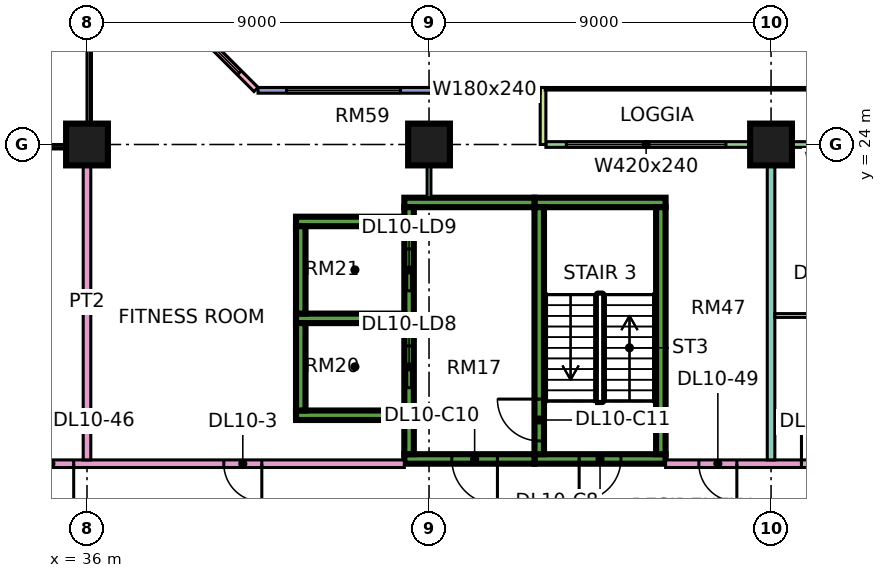
"""IFC4 building model, lengths in metres.
Left out: names, types, materials, properties, quantities, classifications, styles, units other than length and angle.
Written with IfcOpenShell. Run it as: python <this file> out.ifc"""

import sys

from ifc_helpers import new_model, si_unit, direction, frame, frame_2d, origin, origin_2d, place, context, subcontext, project, spatial, rectangle, extrude, element, fill, save


model = new_model("IFC4")
c1 = context("Model", 3, precision=1e-05, world=origin(), true_north=direction((0.0, 1.0)))
c2 = subcontext(c1, "Body", "Model", "MODEL_VIEW")
j1 = project(units=[si_unit("LENGTHUNIT", "METRE"), si_unit("PLANEANGLEUNIT", "RADIAN")], contexts=[c1])
p1 = place(None, origin())
s1 = spatial("IfcSite", under=j1, at=p1, CompositionType="ELEMENT")
p2 = place(p1, origin())
s2 = spatial("IfcBuilding", under=s1, at=p2, CompositionType="ELEMENT")
p3 = place(p2, frame((0.0, 0.0, 52.65)))
s3 = spatial("IfcBuildingStorey", under=s2, at=p3, CompositionType="ELEMENT", Elevation=52.65)
for number, where, z_axis, x_axis in (
    (1, (36.0, 24.0, 0.0), (0.0, 0.0, 1.0), (1.0, 0.0, 0.0)),
    (2, (45.0, 24.0, 0.0), (0.0, 0.0, 1.0), (1.0, 0.0, 0.0)),
    (3, (54.0, 24.0, 0.0), (0.0, 0.0, 1.0), (1.0, 0.0, 0.0)),
):
    element("IfcColumn", number, at=place(p3, frame(where, z_axis=z_axis, x_axis=x_axis)), inside=s3, PredefinedType="COLUMN", context=c2, shape_type="SweptSolid", body=[
        extrude(rectangle(XDim=1.1, YDim=1.1, at=origin_2d()), origin(), (0.0, 0.0, 1.0), 3.75),
    ])
p4 = place(p3, frame((47.775, 15.725, 0.0), z_axis=(0.0, 0.0, 1.0), x_axis=(1.0, 0.0, 0.0)))
e4 = element("IfcWall", 4, at=p4, inside=s3, PredefinedType="SHEAR", context=c2, shape_type="SweptSolid", body=[
    extrude(rectangle(XDim=3.45, YDim=0.25, at=frame_2d((1.725, 0.0))), origin(), (0.0, 0.0, 1.0), 3.75),
])
p5 = place(p4, frame((1.175, 0.0, 0.0)))
e5 = element("IfcOpeningElement", 5, at=p5, cuts=e4, PredefinedType="OPENING", context=c2, shape_type="SweptSolid", body=[
    extrude(rectangle(XDim=1.1, YDim=2.2, at=frame_2d((0.55, 1.1))), frame((0.0, 0.135, 0.0), z_axis=(0.0, -1.0, 0.0), x_axis=(1.0, 0.0, 0.0)), (0.0, 0.0, 1.0), 0.27),
])
p6 = place(p3, frame((47.775, 22.475, 0.0), z_axis=(0.0, 0.0, 1.0), x_axis=(1.0, 0.0, 0.0)))
e6 = element("IfcWall", 6, at=p6, inside=s3, PredefinedType="SHEAR", context=c2, shape_type="SweptSolid", body=[
    extrude(rectangle(XDim=3.45, YDim=0.25, at=frame_2d((1.725, 0.0))), origin(), (0.0, 0.0, 1.0), 3.75),
])
p7 = place(p3, frame((47.9, 15.85, 0.0), z_axis=(0.0, 0.0, 1.0), x_axis=(0.0, 1.0, 0.0)))
e7 = element("IfcWall", 7, at=p7, inside=s3, PredefinedType="SHEAR", context=c2, shape_type="SweptSolid", body=[
    extrude(rectangle(XDim=6.5, YDim=0.25, at=frame_2d((3.25, 0.0))), origin(), (0.0, 0.0, 1.0), 3.75),
])
p8 = place(p7, frame((0.35, 0.0, 0.0)))
e8 = element("IfcOpeningElement", 8, at=p8, cuts=e7, PredefinedType="OPENING", context=c2, shape_type="SweptSolid", body=[
    extrude(rectangle(XDim=1.1, YDim=2.2, at=frame_2d((0.55, 1.1))), frame((0.0, 0.135, 0.0), z_axis=(0.0, -1.0, 0.0), x_axis=(1.0, 0.0, 0.0)), (0.0, 0.0, 1.0), 0.27),
])
p9 = place(p3, frame((51.1, 15.85, 0.0), z_axis=(0.0, 0.0, 1.0), x_axis=(0.0, 1.0, 0.0)))
e9 = element("IfcWall", 9, at=p9, inside=s3, PredefinedType="SHEAR", context=c2, shape_type="SweptSolid", body=[
    extrude(rectangle(XDim=6.5, YDim=0.25, at=frame_2d((3.25, 0.0))), origin(), (0.0, 0.0, 1.0), 3.75),
])
p10 = place(p3, frame((44.35, 15.725, 0.0), z_axis=(0.0, 0.0, 1.0), x_axis=(1.0, 0.0, 0.0)))
e10 = element("IfcWall", 10, at=p10, inside=s3, PredefinedType="SHEAR", context=c2, shape_type="SweptSolid", body=[
    extrude(rectangle(XDim=3.425, YDim=0.25, at=frame_2d((1.712, 0.0))), origin(), (0.0, 0.0, 1.0), 3.75),
])
p11 = place(p10, frame((1.25, 0.0, 0.0)))
e11 = element("IfcOpeningElement", 11, at=p11, cuts=e10, PredefinedType="OPENING", context=c2, shape_type="SweptSolid", body=[
    extrude(rectangle(XDim=1.2, YDim=2.2, at=frame_2d((0.6, 1.1))), frame((0.0, 0.135, 0.0), z_axis=(0.0, -1.0, 0.0), x_axis=(1.0, 0.0, 0.0)), (0.0, 0.0, 1.0), 0.27),
])
p12 = place(p3, frame((44.35, 22.475, 0.0), z_axis=(0.0, 0.0, 1.0), x_axis=(1.0, 0.0, 0.0)))
e12 = element("IfcWall", 12, at=p12, inside=s3, PredefinedType="SHEAR", context=c2, shape_type="SweptSolid", body=[
    extrude(rectangle(XDim=3.425, YDim=0.25, at=frame_2d((1.712, 0.0))), origin(), (0.0, 0.0, 1.0), 3.75),
])
p13 = place(p3, frame((44.475, 15.85, 0.0), z_axis=(0.0, 0.0, 1.0), x_axis=(0.0, 1.0, 0.0)))
e13 = element("IfcWall", 13, at=p13, inside=s3, PredefinedType="SHEAR", context=c2, shape_type="SweptSolid", body=[
    extrude(rectangle(XDim=6.5, YDim=0.25, at=frame_2d((3.25, 0.0))), origin(), (0.0, 0.0, 1.0), 3.75),
])
p14 = place(p13, frame((1.75, 0.0, 0.0)))
e14 = element("IfcOpeningElement", 14, at=p14, cuts=e13, PredefinedType="OPENING", context=c2, shape_type="SweptSolid", body=[
    extrude(rectangle(XDim=1.1, YDim=2.2, at=frame_2d((0.55, 1.1))), frame((0.0, 0.135, 0.0), z_axis=(0.0, -1.0, 0.0), x_axis=(1.0, 0.0, 0.0)), (0.0, 0.0, 1.0), 0.27),
])
p15 = place(p13, frame((4.3, 0.0, 0.0)))
e15 = element("IfcOpeningElement", 15, at=p15, cuts=e13, PredefinedType="OPENING", context=c2, shape_type="SweptSolid", body=[
    extrude(rectangle(XDim=1.1, YDim=2.2, at=frame_2d((0.55, 1.1))), frame((0.0, 0.135, 0.0), z_axis=(0.0, -1.0, 0.0), x_axis=(1.0, 0.0, 0.0)), (0.0, 0.0, 1.0), 0.27),
])
for number, where, z_axis, x_axis in (
    (16, (41.5, 16.875, 0.0), (0.0, 0.0, 1.0), (1.0, 0.0, 0.0)),
    (17, (41.5, 19.425, 0.0), (0.0, 0.0, 1.0), (1.0, 0.0, 0.0)),
    (18, (41.5, 21.975, 0.0), (0.0, 0.0, 1.0), (1.0, 0.0, 0.0)),
):
    element("IfcWall", number, at=place(p3, frame(where, z_axis=z_axis, x_axis=x_axis)), inside=s3, PredefinedType="SHEAR", context=c2, shape_type="SweptSolid", body=[
        extrude(rectangle(XDim=2.85, YDim=0.25, at=frame_2d((1.425, 0.0))), origin(), (0.0, 0.0, 1.0), 3.75),
    ])
for number, where, z_axis, x_axis in (
    (19, (41.625, 17.0, 0.0), (0.0, 0.0, 1.0), (0.0, 1.0, 0.0)),
    (20, (41.625, 19.55, 0.0), (0.0, 0.0, 1.0), (0.0, 1.0, 0.0)),
):
    element("IfcWall", number, at=place(p3, frame(where, z_axis=z_axis, x_axis=x_axis)), inside=s3, PredefinedType="SHEAR", context=c2, shape_type="SweptSolid", body=[
        extrude(rectangle(XDim=2.3, YDim=0.25, at=frame_2d((1.15, 0.0))), origin(), (0.0, 0.0, 1.0), 3.75),
    ])
p16 = place(p3, frame((59.925, 24.0, 0.0), z_axis=(0.0, 0.0, 1.0), x_axis=(-1.0, 0.0, 0.0)))
e21 = element("IfcWall", 21, at=p16, inside=s3, PredefinedType="SOLIDWALL", context=c2, shape_type="SweptSolid", body=[
    extrude(rectangle(XDim=11.85, YDim=0.15, at=frame_2d((5.925, 0.0))), origin(), (0.0, 0.0, 1.0), 3.35),
])
p17 = place(p16, frame((0.562, 0.0, 0.45)))
e22 = element("IfcOpeningElement", 22, at=p17, cuts=e21, PredefinedType="OPENING", context=c2, shape_type="SweptSolid", body=[
    extrude(rectangle(XDim=1.8, YDim=2.4, at=frame_2d((0.9, 1.2))), frame((0.0, 0.085, 0.0), z_axis=(0.0, -1.0, 0.0), x_axis=(1.0, 0.0, 0.0)), (0.0, 0.0, 1.0), 0.17),
])
p18 = place(p16, frame((3.5, 0.0, 0.45)))
e23 = element("IfcOpeningElement", 23, at=p18, cuts=e21, PredefinedType="OPENING", context=c2, shape_type="SweptSolid", body=[
    extrude(rectangle(XDim=1.2, YDim=2.4, at=frame_2d((0.6, 1.2))), frame((0.0, 0.085, 0.0), z_axis=(0.0, -1.0, 0.0), x_axis=(1.0, 0.0, 0.0)), (0.0, 0.0, 1.0), 0.17),
])
p19 = place(p16, frame((7.113, 0.0, 0.45)))
e24 = element("IfcOpeningElement", 24, at=p19, cuts=e21, PredefinedType="OPENING", context=c2, shape_type="SweptSolid", body=[
    extrude(rectangle(XDim=4.2, YDim=2.4, at=frame_2d((2.1, 1.2))), frame((0.0, 0.085, 0.0), z_axis=(0.0, -1.0, 0.0), x_axis=(1.0, 0.0, 0.0)), (0.0, 0.0, 1.0), 0.17),
])
p20 = place(p3, frame((48.0, 25.5, 0.0), z_axis=(0.0, 0.0, 1.0), x_axis=(0.0, -1.0, 0.0)))
e25 = element("IfcWall", 25, at=p20, inside=s3, PredefinedType="SOLIDWALL", context=c2, shape_type="SweptSolid", body=[
    extrude(rectangle(XDim=1.5, YDim=0.15, at=frame_2d((0.75, 0.0))), origin(), (0.0, 0.0, 1.0), 3.35),
])
p21 = place(p3, frame((47.925, 25.425, 0.0), z_axis=(0.0, 0.0, 1.0), x_axis=(-1.0, 0.0, 0.0)))
e26 = element("IfcWall", 26, at=p21, inside=s3, PredefinedType="SOLIDWALL", context=c2, shape_type="SweptSolid", body=[
    extrude(rectangle(XDim=7.425, YDim=0.15, at=frame_2d((3.712, 0.0))), origin(), (0.0, 0.0, 1.0), 3.35),
])
p22 = place(p21, frame((0.562, 0.0, 0.45)))
e27 = element("IfcOpeningElement", 27, at=p22, cuts=e26, PredefinedType="OPENING", context=c2, shape_type="SweptSolid", body=[
    extrude(rectangle(XDim=1.8, YDim=2.4, at=frame_2d((0.9, 1.2))), frame((0.0, 0.085, 0.0), z_axis=(0.0, -1.0, 0.0), x_axis=(1.0, 0.0, 0.0)), (0.0, 0.0, 1.0), 0.17),
])
p23 = place(p21, frame((3.675, 0.0, 0.45)))
e28 = element("IfcOpeningElement", 28, at=p23, cuts=e26, PredefinedType="OPENING", context=c2, shape_type="SweptSolid", body=[
    extrude(rectangle(XDim=3.0, YDim=2.4, at=frame_2d((1.5, 1.2))), frame((0.0, 0.085, 0.0), z_axis=(0.0, -1.0, 0.0), x_axis=(1.0, 0.0, 0.0)), (0.0, 0.0, 1.0), 0.17),
])
p24 = place(p3, frame((40.447, 25.447, 0.0), z_axis=(0.0, 0.0, 1.0), x_axis=(-0.707106781187, 0.707106781187, 0.0)))
e29 = element("IfcWall", 29, at=p24, inside=s3, PredefinedType="SOLIDWALL", context=c2, shape_type="SweptSolid", body=[
    extrude(rectangle(XDim=4.243, YDim=0.15, at=frame_2d((2.121, 0.0))), origin(), (0.0, 0.0, 1.0), 3.35),
])
p25 = place(p24, frame((0.621, 0.0, 0.45)))
e30 = element("IfcOpeningElement", 30, at=p25, cuts=e29, PredefinedType="OPENING", context=c2, shape_type="SweptSolid", body=[
    extrude(rectangle(XDim=3.0, YDim=2.4, at=frame_2d((1.5, 1.2))), frame((0.0, 0.085, 0.0), z_axis=(0.0, -1.0, 0.0), x_axis=(1.0, 0.0, 0.0)), (0.0, 0.0, 1.0), 0.17),
])
p26 = place(p3, frame((34.0, 15.6, 0.0), z_axis=(0.0, 0.0, 1.0), x_axis=(1.0, 0.0, 0.0)))
e31 = element("IfcWall", 31, at=p26, inside=s3, PredefinedType="PARTITIONING", context=c2, shape_type="SweptSolid", body=[
    extrude(rectangle(XDim=10.35, YDim=0.2, at=frame_2d((5.175, 0.0))), origin(), (0.0, 0.0, 1.0), 3.35),
])
p27 = place(p26, frame((5.6, 0.0, 0.0)))
e32 = element("IfcOpeningElement", 32, at=p27, cuts=e31, PredefinedType="OPENING", context=c2, shape_type="SweptSolid", body=[
    extrude(rectangle(XDim=1.0, YDim=2.1, at=frame_2d((0.5, 1.05))), frame((0.0, 0.11, 0.0), z_axis=(0.0, -1.0, 0.0), x_axis=(1.0, 0.0, 0.0)), (0.0, 0.0, 1.0), 0.22),
])
p28 = place(p26, frame((0.45, 0.0, 0.0)))
e33 = element("IfcOpeningElement", 33, at=p28, cuts=e31, PredefinedType="OPENING", context=c2, shape_type="SweptSolid", body=[
    extrude(rectangle(XDim=1.2, YDim=2.1, at=frame_2d((0.6, 1.05))), frame((0.0, 0.11, 0.0), z_axis=(0.0, -1.0, 0.0), x_axis=(1.0, 0.0, 0.0)), (0.0, 0.0, 1.0), 0.22),
])
p29 = place(p3, frame((36.0, 15.7, 0.0), z_axis=(0.0, 0.0, 1.0), x_axis=(0.0, 1.0, 0.0)))
e34 = element("IfcWall", 34, at=p29, inside=s3, PredefinedType="PARTITIONING", context=c2, shape_type="SweptSolid", body=[
    extrude(rectangle(XDim=8.3, YDim=0.2, at=frame_2d((4.15, 0.0))), origin(), (0.0, 0.0, 1.0), 3.35),
])
p30 = place(p3, frame((45.0, 22.6, 0.0), z_axis=(0.0, 0.0, 1.0), x_axis=(0.0, 1.0, 0.0)))
e35 = element("IfcWall", 35, at=p30, inside=s3, PredefinedType="PARTITIONING", context=c2, shape_type="SweptSolid", body=[
    extrude(rectangle(XDim=1.4, YDim=0.1, at=frame_2d((0.7, 0.0))), origin(), (0.0, 0.0, 1.0), 3.35),
])
p31 = place(p3, frame((51.225, 15.6, 0.0), z_axis=(0.0, 0.0, 1.0), x_axis=(1.0, 0.0, 0.0)))
e36 = element("IfcWall", 36, at=p31, inside=s3, PredefinedType="PARTITIONING", context=c2, shape_type="SweptSolid", body=[
    extrude(rectangle(XDim=22.125, YDim=0.2, at=frame_2d((11.062, 0.0))), origin(), (0.0, 0.0, 1.0), 3.35),
])
p32 = place(p31, frame((3.575, 0.0, 0.0)))
e37 = element("IfcOpeningElement", 37, at=p32, cuts=e36, PredefinedType="OPENING", context=c2, shape_type="SweptSolid", body=[
    extrude(rectangle(XDim=1.0, YDim=2.1, at=frame_2d((0.5, 1.05))), frame((0.0, 0.11, 0.0), z_axis=(0.0, -1.0, 0.0), x_axis=(1.0, 0.0, 0.0)), (0.0, 0.0, 1.0), 0.22),
])
p33 = place(p31, frame((0.875, 0.0, 0.0)))
e38 = element("IfcOpeningElement", 38, at=p33, cuts=e36, PredefinedType="OPENING", context=c2, shape_type="SweptSolid", body=[
    extrude(rectangle(XDim=1.0, YDim=2.1, at=frame_2d((0.5, 1.05))), frame((0.0, 0.11, 0.0), z_axis=(0.0, -1.0, 0.0), x_axis=(1.0, 0.0, 0.0)), (0.0, 0.0, 1.0), 0.22),
])
p34 = place(p3, frame((54.0, 15.7, 0.0), z_axis=(0.0, 0.0, 1.0), x_axis=(0.0, 1.0, 0.0)))
e39 = element("IfcWall", 39, at=p34, inside=s3, PredefinedType="PARTITIONING", context=c2, shape_type="SweptSolid", body=[
    extrude(rectangle(XDim=8.226, YDim=0.2, at=frame_2d((4.113, 0.0))), origin(), (0.0, 0.0, 1.0), 3.35),
])
p35 = place(p3, frame((54.1, 19.5, 0.0), z_axis=(0.0, 0.0, 1.0), x_axis=(1.0, 0.0, 0.0)))
e40 = element("IfcWall", 40, at=p35, inside=s3, PredefinedType="PARTITIONING", context=c2, shape_type="SweptSolid", body=[
    extrude(rectangle(XDim=8.95, YDim=0.1, at=frame_2d((4.475, 0.0))), origin(), (0.0, 0.0, 1.0), 3.35),
])
p36 = place(p35, frame((0.95, 0.0, 0.0)))
e41 = element("IfcOpeningElement", 41, at=p36, cuts=e40, PredefinedType="OPENING", context=c2, shape_type="SweptSolid", body=[
    extrude(rectangle(XDim=0.9, YDim=2.1, at=frame_2d((0.45, 1.05))), frame((0.0, 0.06, 0.0), z_axis=(0.0, -1.0, 0.0), x_axis=(1.0, 0.0, 0.0)), (0.0, 0.0, 1.0), 0.12),
])
p37 = place(p35, frame((3.95, 0.0, 0.0)))
e42 = element("IfcOpeningElement", 42, at=p37, cuts=e40, PredefinedType="OPENING", context=c2, shape_type="SweptSolid", body=[
    extrude(rectangle(XDim=0.9, YDim=2.1, at=frame_2d((0.45, 1.05))), frame((0.0, 0.06, 0.0), z_axis=(0.0, -1.0, 0.0), x_axis=(1.0, 0.0, 0.0)), (0.0, 0.0, 1.0), 0.12),
])
p38 = place(p35, frame((6.95, 0.0, 0.0)))
e43 = element("IfcOpeningElement", 43, at=p38, cuts=e40, PredefinedType="OPENING", context=c2, shape_type="SweptSolid", body=[
    extrude(rectangle(XDim=0.9, YDim=2.1, at=frame_2d((0.45, 1.05))), frame((0.0, 0.06, 0.0), z_axis=(0.0, -1.0, 0.0), x_axis=(1.0, 0.0, 0.0)), (0.0, 0.0, 1.0), 0.12),
])
p39 = place(p19, origin())
e44 = element("IfcWindow", 44, at=p39, inside=s3, PartitioningType="SINGLE_PANEL", PredefinedType="WINDOW", context=c2, shape_type="SweptSolid", body=[
    extrude(rectangle(XDim=4.2, YDim=2.4, at=frame_2d((2.1, 1.2))), frame((0.0, 0.03, 0.0), z_axis=(0.0, -1.0, 0.0), x_axis=(1.0, 0.0, 0.0)), (0.0, 0.0, 1.0), 0.06),
])
fill(e24, e44)
p40 = place(p22, origin())
e45 = element("IfcWindow", 45, at=p40, inside=s3, PartitioningType="SINGLE_PANEL", PredefinedType="WINDOW", context=c2, shape_type="SweptSolid", body=[
    extrude(rectangle(XDim=1.8, YDim=2.4, at=frame_2d((0.9, 1.2))), frame((0.0, 0.03, 0.0), z_axis=(0.0, -1.0, 0.0), x_axis=(1.0, 0.0, 0.0)), (0.0, 0.0, 1.0), 0.06),
])
fill(e27, e45)
p41 = place(p23, origin())
e46 = element("IfcWindow", 46, at=p41, inside=s3, PartitioningType="SINGLE_PANEL", PredefinedType="WINDOW", context=c2, shape_type="SweptSolid", body=[
    extrude(rectangle(XDim=3.0, YDim=2.4, at=frame_2d((1.5, 1.2))), frame((0.0, 0.03, 0.0), z_axis=(0.0, -1.0, 0.0), x_axis=(1.0, 0.0, 0.0)), (0.0, 0.0, 1.0), 0.06),
])
fill(e28, e46)
p42 = place(p25, origin())
e47 = element("IfcWindow", 47, at=p42, inside=s3, PartitioningType="SINGLE_PANEL", PredefinedType="WINDOW", context=c2, shape_type="SweptSolid", body=[
    extrude(rectangle(XDim=3.0, YDim=2.4, at=frame_2d((1.5, 1.2))), frame((0.0, 0.03, 0.0), z_axis=(0.0, -1.0, 0.0), x_axis=(1.0, 0.0, 0.0)), (0.0, 0.0, 1.0), 0.06),
])
fill(e30, e47)
p43 = place(p5, frame((1.1, 0.0, 0.0), z_axis=(0.0, 0.0, 1.0), x_axis=(-1.0, 0.0, 0.0)))
e48 = element("IfcDoor", 48, at=p43, inside=s3, OperationType="SINGLE_SWING_LEFT", PredefinedType="DOOR", context=c2, shape_type="SweptSolid", body=[
    extrude(rectangle(XDim=1.1, YDim=2.2, at=frame_2d((0.55, 1.1))), frame((0.0, 0.025, 0.0), z_axis=(0.0, -1.0, 0.0), x_axis=(1.0, 0.0, 0.0)), (0.0, 0.0, 1.0), 0.05),
])
fill(e5, e48)
p44 = place(p11, origin())
e49 = element("IfcDoor", 49, at=p44, inside=s3, OperationType="SINGLE_SWING_RIGHT", PredefinedType="DOOR", context=c2, shape_type="SweptSolid", body=[
    extrude(rectangle(XDim=1.2, YDim=2.2, at=frame_2d((0.6, 1.1))), frame((0.0, 0.025, 0.0), z_axis=(0.0, -1.0, 0.0), x_axis=(1.0, 0.0, 0.0)), (0.0, 0.0, 1.0), 0.05),
])
fill(e11, e49)
p45 = place(p8, frame((1.1, 0.0, 0.0), z_axis=(0.0, 0.0, 1.0), x_axis=(-1.0, 0.0, 0.0)))
e50 = element("IfcDoor", 50, at=p45, inside=s3, OperationType="SINGLE_SWING_RIGHT", PredefinedType="DOOR", context=c2, shape_type="SweptSolid", body=[
    extrude(rectangle(XDim=1.1, YDim=2.2, at=frame_2d((0.55, 1.1))), frame((0.0, 0.025, 0.0), z_axis=(0.0, -1.0, 0.0), x_axis=(1.0, 0.0, 0.0)), (0.0, 0.0, 1.0), 0.05),
])
fill(e8, e50)
p46 = place(p14, origin())
e51 = element("IfcDoor", 51, at=p46, inside=s3, OperationType="DOUBLE_DOOR_SLIDING", PredefinedType="DOOR", context=c2, shape_type="SweptSolid", body=[
    extrude(rectangle(XDim=1.1, YDim=2.2, at=frame_2d((0.55, 1.1))), frame((0.0, 0.025, 0.0), z_axis=(0.0, -1.0, 0.0), x_axis=(1.0, 0.0, 0.0)), (0.0, 0.0, 1.0), 0.05),
])
fill(e14, e51)
p47 = place(p15, origin())
e52 = element("IfcDoor", 52, at=p47, inside=s3, OperationType="DOUBLE_DOOR_SLIDING", PredefinedType="DOOR", context=c2, shape_type="SweptSolid", body=[
    extrude(rectangle(XDim=1.1, YDim=2.2, at=frame_2d((0.55, 1.1))), frame((0.0, 0.025, 0.0), z_axis=(0.0, -1.0, 0.0), x_axis=(1.0, 0.0, 0.0)), (0.0, 0.0, 1.0), 0.05),
])
fill(e15, e52)
p48 = place(p27, origin())
e53 = element("IfcDoor", 53, at=p48, inside=s3, OperationType="SINGLE_SWING_RIGHT", PredefinedType="DOOR", context=c2, shape_type="SweptSolid", body=[
    extrude(rectangle(XDim=1.0, YDim=2.1, at=frame_2d((0.5, 1.05))), frame((0.0, 0.025, 0.0), z_axis=(0.0, -1.0, 0.0), x_axis=(1.0, 0.0, 0.0)), (0.0, 0.0, 1.0), 0.05),
])
fill(e32, e53)
p49 = place(p32, origin())
e54 = element("IfcDoor", 54, at=p49, inside=s3, OperationType="SINGLE_SWING_LEFT", PredefinedType="DOOR", context=c2, shape_type="SweptSolid", body=[
    extrude(rectangle(XDim=1.0, YDim=2.1, at=frame_2d((0.5, 1.05))), frame((0.0, 0.025, 0.0), z_axis=(0.0, -1.0, 0.0), x_axis=(1.0, 0.0, 0.0)), (0.0, 0.0, 1.0), 0.05),
])
fill(e37, e54)
p50 = place(p28, origin())
e55 = element("IfcDoor", 55, at=p50, inside=s3, OperationType="SINGLE_SWING_RIGHT", PredefinedType="DOOR", context=c2, shape_type="SweptSolid", body=[
    extrude(rectangle(XDim=1.2, YDim=2.1, at=frame_2d((0.6, 1.05))), frame((0.0, 0.025, 0.0), z_axis=(0.0, -1.0, 0.0), x_axis=(1.0, 0.0, 0.0)), (0.0, 0.0, 1.0), 0.05),
])
fill(e33, e55)
p51 = place(p33, origin())
e56 = element("IfcDoor", 56, at=p51, inside=s3, OperationType="SINGLE_SWING_RIGHT", PredefinedType="DOOR", context=c2, shape_type="SweptSolid", body=[
    extrude(rectangle(XDim=1.0, YDim=2.1, at=frame_2d((0.5, 1.05))), frame((0.0, 0.025, 0.0), z_axis=(0.0, -1.0, 0.0), x_axis=(1.0, 0.0, 0.0)), (0.0, 0.0, 1.0), 0.05),
])
fill(e38, e56)
save(model, sys.argv[1])
